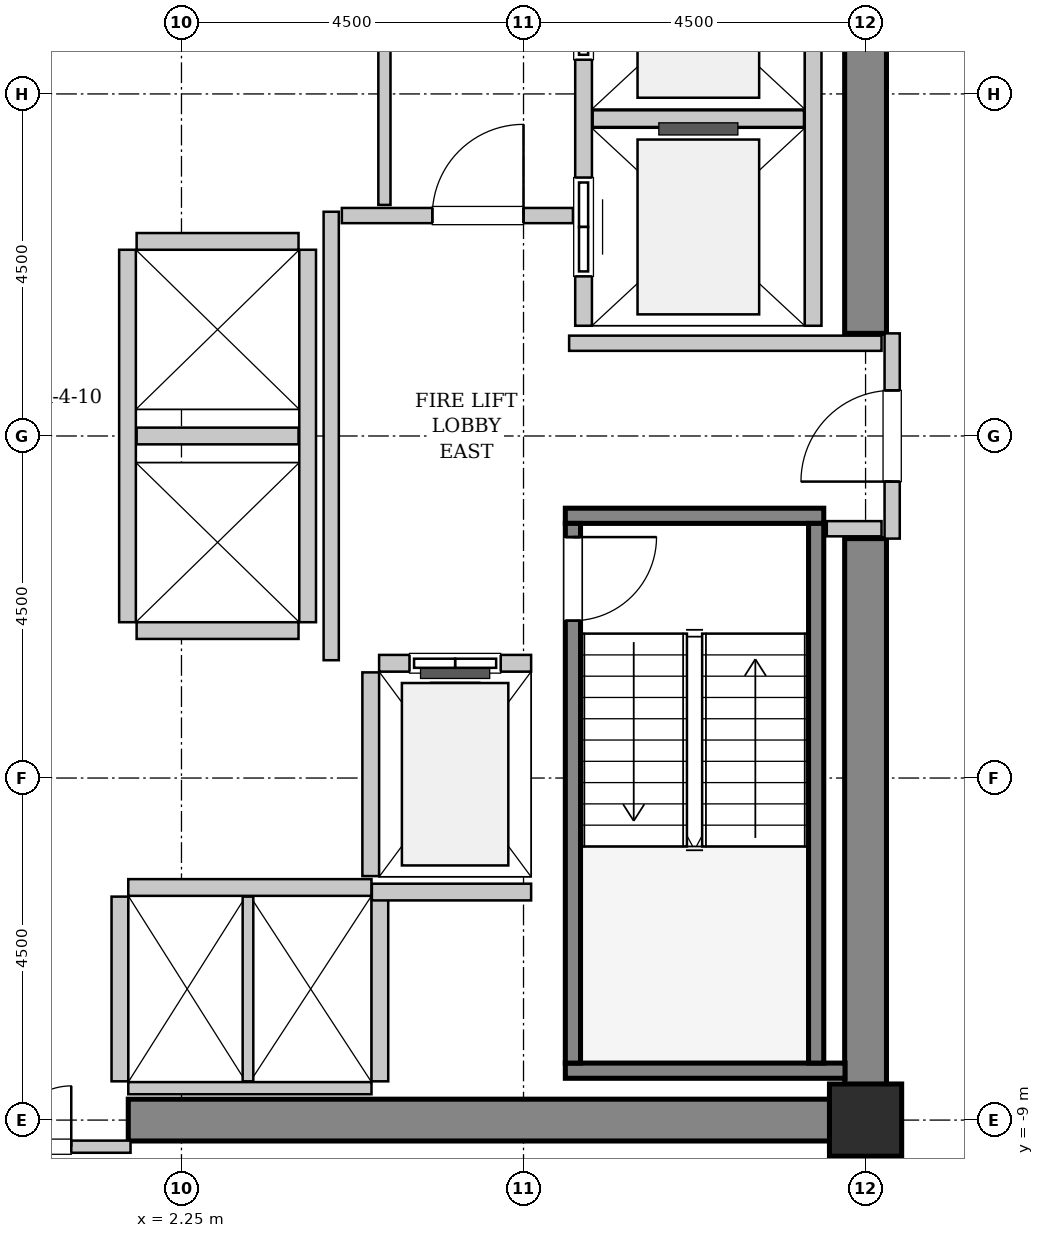
"""IFC4 building model, lengths in metres.
Left out: names, types, materials, properties, quantities, classifications, styles, units other than length and angle.
Written with IfcOpenShell. Run it as: python <this file> out.ifc"""

import sys

from ifc_helpers import new_model, si_unit, direction, frame, frame_2d, origin, origin_2d, place, context, subcontext, project, spatial, rectangle, hollow_rectangle, extrude, source, transform, mapped, element, fill, save


model = new_model("IFC4")
c1 = context("Model", 3, precision=1e-05, world=origin(), true_north=direction((0.0, 1.0)))
c2 = subcontext(c1, "Body", "Model", "MODEL_VIEW")
j1 = project(units=[si_unit("LENGTHUNIT", "METRE"), si_unit("PLANEANGLEUNIT", "RADIAN")], contexts=[c1])
p1 = place(None, origin())
s1 = spatial("IfcSite", under=j1, at=p1, CompositionType="ELEMENT")
p2 = place(p1, origin())
s2 = spatial("IfcBuilding", under=s1, at=p2, CompositionType="ELEMENT")
p3 = place(p2, frame((0.0, 0.0, 132.6)))
s3 = spatial("IfcBuildingStorey", under=s2, at=p3, CompositionType="ELEMENT", Elevation=132.6)
m1 = source(origin(), c2, "Body", "SweptSolid", [
    extrude(rectangle(XDim=9.975, YDim=0.55, at=frame_2d((4.987, 0.0))), origin(), (0.0, 0.0, 1.0), 3.8),
])
p4 = place(p3, frame((1.55, -9.0, 0.0), z_axis=(0.0, 0.0, 1.0), x_axis=(1.0, 0.0, 0.0)))
e1 = element("IfcWall", 1, at=p4, inside=s3, PredefinedType="SHEAR", context=c2, shape_type="MappedRepresentation", body=[
    mapped(m1, transform((0.0, 0.0, 0.0), x_axis=(1.0, 0.0, 0.0), y_axis=(0.0, 1.0, 0.0), z_axis=(0.0, 0.0, 1.0), scale=1.0)),
])
m2 = source(origin(), c2, "Body", "SweptSolid", [
    extrude(rectangle(XDim=7.375, YDim=0.55, at=frame_2d((3.688, 0.0))), origin(), (0.0, 0.0, 1.0), 3.8),
])
for number, where, z_axis, x_axis in (
    (2, (11.25, -8.725, 0.0), (0.0, 0.0, 1.0), (0.0, 1.0, 0.0)),
    (3, (11.25, 1.35, 0.0), (0.0, 0.0, 1.0), (0.0, 1.0, 0.0)),
):
    element("IfcWall", number, at=place(p3, frame(where, z_axis=z_axis, x_axis=x_axis)), inside=s3, PredefinedType="SHEAR", context=c2, shape_type="MappedRepresentation", body=[
        mapped(m2, transform((0.0, 0.0, 0.0), x_axis=(1.0, 0.0, 0.0), y_axis=(0.0, 1.0, 0.0), z_axis=(0.0, 0.0, 1.0), scale=1.0)),
    ])
m3 = source(origin(), c2, "Body", "SweptSolid", [
    extrude(hollow_rectangle(XDim=0.95, YDim=0.95, WallThickness=0.045, InnerFilletRadius=0.045, OuterFilletRadius=0.09, at=origin_2d()), origin(), (0.0, 0.0, 1.0), 3.8),
])
p5 = place(p3, frame((11.25, -9.0, 0.0), z_axis=(0.0, 0.0, 1.0), x_axis=(1.0, 0.0, 0.0)))
e4 = element("IfcColumn", 4, at=p5, inside=s3, PredefinedType="COLUMN", context=c2, shape_type="MappedRepresentation", body=[
    mapped(m3, transform((0.0, 0.0, 0.0), x_axis=(1.0, 0.0, 0.0), y_axis=(0.0, 1.0, 0.0), z_axis=(0.0, 0.0, 1.0), scale=1.0)),
])
m4 = source(origin(), c2, "Body", "SweptSolid", [
    extrude(rectangle(XDim=3.4, YDim=0.2, at=frame_2d((1.7, 0.0))), origin(), (0.0, 0.0, 1.0), 3.8),
])
p6 = place(p3, frame((7.3, -1.05, 0.0), z_axis=(0.0, 0.0, 1.0), x_axis=(1.0, 0.0, 0.0)))
e5 = element("IfcWall", 5, at=p6, inside=s3, PredefinedType="SOLIDWALL", context=c2, shape_type="MappedRepresentation", body=[
    mapped(m4, transform((0.0, 0.0, 0.0), x_axis=(1.0, 0.0, 0.0), y_axis=(0.0, 1.0, 0.0), z_axis=(0.0, 0.0, 1.0), scale=1.0)),
])
m5 = source(origin(), c2, "Body", "SweptSolid", [
    extrude(rectangle(XDim=3.68, YDim=0.2, at=frame_2d((1.84, 0.0))), origin(), (0.0, 0.0, 1.0), 3.8),
])
p7 = place(p3, frame((7.3, -8.35, 0.0), z_axis=(0.0, 0.0, 1.0), x_axis=(1.0, 0.0, 0.0)))
e6 = element("IfcWall", 6, at=p7, inside=s3, PredefinedType="SOLIDWALL", context=c2, shape_type="MappedRepresentation", body=[
    mapped(m5, transform((0.0, 0.0, 0.0), x_axis=(1.0, 0.0, 0.0), y_axis=(0.0, 1.0, 0.0), z_axis=(0.0, 0.0, 1.0), scale=1.0)),
])
m6 = source(origin(), c2, "Body", "SweptSolid", [
    extrude(rectangle(XDim=7.1, YDim=0.2, at=frame_2d((3.55, 0.0))), origin(), (0.0, 0.0, 1.0), 3.8),
])
p8 = place(p3, frame((7.4, -1.15, 0.0), z_axis=(0.0, 0.0, 1.0), x_axis=(0.0, -1.0, 0.0)))
e7 = element("IfcWall", 7, at=p8, inside=s3, PredefinedType="SOLIDWALL", context=c2, shape_type="MappedRepresentation", body=[
    mapped(m6, transform((0.0, 0.0, 0.0), x_axis=(1.0, 0.0, 0.0), y_axis=(0.0, 1.0, 0.0), z_axis=(0.0, 0.0, 1.0), scale=1.0)),
])
p9 = place(p8, frame((0.18, 0.0, 0.0)))
e8 = element("IfcOpeningElement", 8, at=p9, cuts=e7, PredefinedType="OPENING", context=c2, shape_type="SweptSolid", body=[
    extrude(rectangle(XDim=1.1, YDim=2.15, at=frame_2d((0.55, 1.075))), frame((0.0, 0.11, 0.0), z_axis=(0.0, -1.0, 0.0), x_axis=(1.0, 0.0, 0.0)), (0.0, 0.0, 1.0), 0.22),
])
p10 = place(p3, frame((10.6, -1.15, 0.0), z_axis=(0.0, 0.0, 1.0), x_axis=(0.0, -1.0, 0.0)))
e9 = element("IfcWall", 9, at=p10, inside=s3, PredefinedType="SOLIDWALL", context=c2, shape_type="MappedRepresentation", body=[
    mapped(m6, transform((0.0, 0.0, 0.0), x_axis=(1.0, 0.0, 0.0), y_axis=(0.0, 1.0, 0.0), z_axis=(0.0, 0.0, 1.0), scale=1.0)),
])
m7 = source(origin(), c2, "Body", "SweptSolid", [
    extrude(rectangle(XDim=2.0, YDim=0.22, at=frame_2d((1.0, 0.0))), origin(), (0.0, 0.0, 1.0), 3.535),
])
p11 = place(p3, frame((6.85, -2.99, 0.0), z_axis=(0.0, 0.0, 1.0), x_axis=(-1.0, 0.0, 0.0)))
e10 = element("IfcWall", 10, at=p11, inside=s3, PredefinedType="SOLIDWALL", context=c2, shape_type="MappedRepresentation", body=[
    mapped(m7, transform((0.0, 0.0, 0.0), x_axis=(1.0, 0.0, 0.0), y_axis=(0.0, 1.0, 0.0), z_axis=(0.0, 0.0, 1.0), scale=1.0)),
])
p12 = place(p11, frame((0.4, 0.0, 0.0)))
e11 = element("IfcOpeningElement", 11, at=p12, cuts=e10, PredefinedType="OPENING", context=c2, shape_type="SweptSolid", body=[
    extrude(rectangle(XDim=1.2, YDim=2.2, at=frame_2d((0.6, 1.1))), frame((0.0, 0.12, 0.0), z_axis=(0.0, -1.0, 0.0), x_axis=(1.0, 0.0, 0.0)), (0.0, 0.0, 1.0), 0.24),
])
m8 = source(origin(), c2, "Body", "SweptSolid", [
    extrude(rectangle(XDim=2.68, YDim=0.22, at=frame_2d((1.34, 0.0))), origin(), (0.0, 0.0, 1.0), 3.535),
])
p13 = place(p3, frame((4.74, -3.11, 0.0), z_axis=(0.0, 0.0, 1.0), x_axis=(0.0, -1.0, 0.0)))
e12 = element("IfcWall", 12, at=p13, inside=s3, PredefinedType="SOLIDWALL", context=c2, shape_type="MappedRepresentation", body=[
    mapped(m8, transform((0.0, 0.0, 0.0), x_axis=(1.0, 0.0, 0.0), y_axis=(0.0, 1.0, 0.0), z_axis=(0.0, 0.0, 1.0), scale=1.0)),
])
m9 = source(origin(), c2, "Body", "SweptSolid", [
    extrude(rectangle(XDim=5.45, YDim=0.22, at=frame_2d((2.725, 0.0))), origin(), (0.0, 0.0, 1.0), 3.535),
])
p14 = place(p3, frame((7.54, 6.9, 0.0), z_axis=(0.0, 0.0, 1.0), x_axis=(0.0, -1.0, 0.0)))
e13 = element("IfcWall", 13, at=p14, inside=s3, PredefinedType="SOLIDWALL", context=c2, shape_type="MappedRepresentation", body=[
    mapped(m9, transform((0.0, 0.0, 0.0), x_axis=(1.0, 0.0, 0.0), y_axis=(0.0, 1.0, 0.0), z_axis=(0.0, 0.0, 1.0), scale=1.0)),
])
p15 = place(p14, frame((3.5, 0.0, 0.0)))
e14 = element("IfcOpeningElement", 14, at=p15, cuts=e13, PredefinedType="OPENING", context=c2, shape_type="SweptSolid", body=[
    extrude(rectangle(XDim=1.3, YDim=2.3, at=frame_2d((0.65, 1.15))), frame((0.0, 0.12, 0.0), z_axis=(0.0, -1.0, 0.0), x_axis=(1.0, 0.0, 0.0)), (0.0, 0.0, 1.0), 0.24),
])
p16 = place(p14, frame((0.65, 0.0, 0.0)))
e15 = element("IfcOpeningElement", 15, at=p16, cuts=e13, PredefinedType="OPENING", context=c2, shape_type="SweptSolid", body=[
    extrude(rectangle(XDim=1.3, YDim=2.3, at=frame_2d((0.65, 1.15))), frame((0.0, 0.12, 0.0), z_axis=(0.0, -1.0, 0.0), x_axis=(1.0, 0.0, 0.0)), (0.0, 0.0, 1.0), 0.24),
])
p17 = place(p3, frame((10.56, 1.45, 0.0), z_axis=(0.0, 0.0, 1.0), x_axis=(0.0, 1.0, 0.0)))
e16 = element("IfcWall", 16, at=p17, inside=s3, PredefinedType="SOLIDWALL", context=c2, shape_type="MappedRepresentation", body=[
    mapped(m9, transform((0.0, 0.0, 0.0), x_axis=(1.0, 0.0, 0.0), y_axis=(0.0, 1.0, 0.0), z_axis=(0.0, 0.0, 1.0), scale=1.0)),
])
m10 = source(origin(), c2, "Body", "SweptSolid", [
    extrude(rectangle(XDim=2.78, YDim=0.22, at=frame_2d((1.39, 0.0))), origin(), (0.0, 0.0, 1.0), 3.535),
])
p18 = place(p3, frame((7.66, 4.175, 0.0), z_axis=(0.0, 0.0, 1.0), x_axis=(1.0, 0.0, 0.0)))
e17 = element("IfcWall", 17, at=p18, inside=s3, PredefinedType="SOLIDWALL", context=c2, shape_type="MappedRepresentation", body=[
    mapped(m10, transform((0.0, 0.0, 0.0), x_axis=(1.0, 0.0, 0.0), y_axis=(0.0, 1.0, 0.0), z_axis=(0.0, 0.0, 1.0), scale=1.0)),
])
m11 = source(origin(), c2, "Body", "SweptSolid", [
    extrude(rectangle(XDim=3.2, YDim=0.22, at=frame_2d((1.6, 0.0))), origin(), (0.0, 0.0, 1.0), 3.535),
])
p19 = place(p3, frame((4.75, -5.94, 0.0), z_axis=(0.0, 0.0, 1.0), x_axis=(-1.0, 0.0, 0.0)))
e18 = element("IfcWall", 18, at=p19, inside=s3, PredefinedType="SOLIDWALL", context=c2, shape_type="MappedRepresentation", body=[
    mapped(m11, transform((0.0, 0.0, 0.0), x_axis=(1.0, 0.0, 0.0), y_axis=(0.0, 1.0, 0.0), z_axis=(0.0, 0.0, 1.0), scale=1.0)),
])
m12 = source(origin(), c2, "Body", "SweptSolid", [
    extrude(rectangle(XDim=3.2, YDim=0.16, at=frame_2d((1.6, 0.0))), origin(), (0.0, 0.0, 1.0), 2.425),
])
p20 = place(p3, frame((1.55, -8.58, 0.0), z_axis=(0.0, 0.0, 1.0), x_axis=(1.0, 0.0, 0.0)))
e19 = element("IfcWall", 19, at=p20, inside=s3, PredefinedType="PARTITIONING", context=c2, shape_type="MappedRepresentation", body=[
    mapped(m12, transform((0.0, 0.0, 0.0), x_axis=(1.0, 0.0, 0.0), y_axis=(0.0, 1.0, 0.0), z_axis=(0.0, 0.0, 1.0), scale=1.0)),
])
m13 = source(origin(), c2, "Body", "SweptSolid", [
    extrude(rectangle(XDim=2.43, YDim=0.22, at=frame_2d((1.215, 0.0))), origin(), (0.0, 0.0, 1.0), 3.535),
])
p21 = place(p3, frame((1.44, -6.06, 0.0), z_axis=(0.0, 0.0, 1.0), x_axis=(0.0, -1.0, 0.0)))
e20 = element("IfcWall", 20, at=p21, inside=s3, PredefinedType="SOLIDWALL", context=c2, shape_type="MappedRepresentation", body=[
    mapped(m13, transform((0.0, 0.0, 0.0), x_axis=(1.0, 0.0, 0.0), y_axis=(0.0, 1.0, 0.0), z_axis=(0.0, 0.0, 1.0), scale=1.0)),
])
m14 = source(origin(), c2, "Body", "SweptSolid", [
    extrude(rectangle(XDim=2.43, YDim=0.14, at=frame_2d((1.215, 0.0))), origin(), (0.0, 0.0, 1.0), 3.535),
])
p22 = place(p3, frame((3.125, -8.49, 0.0), z_axis=(0.0, 0.0, 1.0), x_axis=(0.0, 1.0, 0.0)))
e21 = element("IfcWall", 21, at=p22, inside=s3, PredefinedType="PARTITIONING", context=c2, shape_type="MappedRepresentation", body=[
    mapped(m14, transform((0.0, 0.0, 0.0), x_axis=(1.0, 0.0, 0.0), y_axis=(0.0, 1.0, 0.0), z_axis=(0.0, 0.0, 1.0), scale=1.0)),
])
p23 = place(p3, frame((4.86, -8.49, 0.0), z_axis=(0.0, 0.0, 1.0), x_axis=(0.0, 1.0, 0.0)))
e22 = element("IfcWall", 22, at=p23, inside=s3, PredefinedType="SOLIDWALL", context=c2, shape_type="MappedRepresentation", body=[
    mapped(m13, transform((0.0, 0.0, 0.0), x_axis=(1.0, 0.0, 0.0), y_axis=(0.0, 1.0, 0.0), z_axis=(0.0, 0.0, 1.0), scale=1.0)),
])
m15 = source(origin(), c2, "Body", "SweptSolid", [
    extrude(rectangle(XDim=4.9, YDim=0.22, at=frame_2d((2.45, 0.0))), origin(), (0.0, 0.0, 1.0), 3.535),
])
for number, where, z_axis, x_axis in (
    (23, (1.54, 2.45, 0.0), (0.0, 0.0, 1.0), (0.0, -1.0, 0.0)),
    (24, (3.91, -2.45, 0.0), (0.0, 0.0, 1.0), (0.0, 1.0, 0.0)),
):
    element("IfcWall", number, at=place(p3, frame(where, z_axis=z_axis, x_axis=x_axis)), inside=s3, PredefinedType="SOLIDWALL", context=c2, shape_type="MappedRepresentation", body=[
        mapped(m15, transform((0.0, 0.0, 0.0), x_axis=(1.0, 0.0, 0.0), y_axis=(0.0, 1.0, 0.0), z_axis=(0.0, 0.0, 1.0), scale=1.0)),
    ])
m16 = source(origin(), c2, "Body", "SweptSolid", [
    extrude(rectangle(XDim=2.13, YDim=0.22, at=frame_2d((1.065, 0.0))), origin(), (0.0, 0.0, 1.0), 3.535),
])
for number, where, z_axis, x_axis in (
    (25, (1.66, -2.56, 0.0), (0.0, 0.0, 1.0), (1.0, 0.0, 0.0)),
    (26, (1.66, 0.0, 0.0), (0.0, 0.0, 1.0), (1.0, 0.0, 0.0)),
    (27, (3.79, 2.56, 0.0), (0.0, 0.0, 1.0), (-1.0, 0.0, 0.0)),
):
    element("IfcWall", number, at=place(p3, frame(where, z_axis=z_axis, x_axis=x_axis)), inside=s3, PredefinedType="SOLIDWALL", context=c2, shape_type="MappedRepresentation", body=[
        mapped(m16, transform((0.0, 0.0, 0.0), x_axis=(1.0, 0.0, 0.0), y_axis=(0.0, 1.0, 0.0), z_axis=(0.0, 0.0, 1.0), scale=1.0)),
    ])
m17 = source(origin(), c2, "Body", "SweptSolid", [
    extrude(rectangle(XDim=2.095, YDim=0.22, at=frame_2d((1.048, 0.0))), origin(), (0.0, 0.0, 1.0), 3.535),
])
p24 = place(p3, frame((4.755, -6.0, 0.0), z_axis=(0.0, 0.0, 1.0), x_axis=(1.0, 0.0, 0.0)))
e28 = element("IfcWall", 28, at=p24, inside=s3, PredefinedType="SOLIDWALL", context=c2, shape_type="MappedRepresentation", body=[
    mapped(m17, transform((0.0, 0.0, 0.0), x_axis=(1.0, 0.0, 0.0), y_axis=(0.0, 1.0, 0.0), z_axis=(0.0, 0.0, 1.0), scale=1.0)),
])
m18 = source(origin(), c2, "Body", "SweptSolid", [
    extrude(rectangle(XDim=2.7, YDim=0.2, at=frame_2d((1.35, 0.0))), origin(), (0.0, 0.0, 1.0), 2.425),
])
p25 = place(p3, frame((11.6, -1.35, 0.0), z_axis=(0.0, 0.0, 1.0), x_axis=(0.0, 1.0, 0.0)))
e29 = element("IfcWall", 29, at=p25, inside=s3, PredefinedType="PARTITIONING", context=c2, shape_type="MappedRepresentation", body=[
    mapped(m18, transform((0.0, 0.0, 0.0), x_axis=(1.0, 0.0, 0.0), y_axis=(0.0, 1.0, 0.0), z_axis=(0.0, 0.0, 1.0), scale=1.0)),
])
p26 = place(p25, frame((0.75, 0.0, 0.0)))
e30 = element("IfcOpeningElement", 30, at=p26, cuts=e29, PredefinedType="OPENING", context=c2, shape_type="SweptSolid", body=[
    extrude(rectangle(XDim=1.2, YDim=2.15, at=frame_2d((0.6, 1.075))), frame((0.0, 0.11, 0.0), z_axis=(0.0, -1.0, 0.0), x_axis=(1.0, 0.0, 0.0)), (0.0, 0.0, 1.0), 0.22),
])
m19 = source(origin(), c2, "Body", "SweptSolid", [
    extrude(rectangle(XDim=5.9, YDim=0.2, at=frame_2d((2.95, 0.0))), origin(), (0.0, 0.0, 1.0), 3.535),
])
p27 = place(p3, frame((4.22, -2.95, 0.0), z_axis=(0.0, 0.0, 1.0), x_axis=(0.0, 1.0, 0.0)))
e31 = element("IfcWall", 31, at=p27, inside=s3, PredefinedType="PARTITIONING", context=c2, shape_type="MappedRepresentation", body=[
    mapped(m19, transform((0.0, 0.0, 0.0), x_axis=(1.0, 0.0, 0.0), y_axis=(0.0, 1.0, 0.0), z_axis=(0.0, 0.0, 1.0), scale=1.0)),
])
m20 = source(origin(), c2, "Body", "SweptSolid", [
    extrude(rectangle(XDim=3.04, YDim=0.2, at=frame_2d((1.52, 0.0))), origin(), (0.0, 0.0, 1.0), 3.535),
])
p28 = place(p3, frame((4.36, 2.9, 0.0), z_axis=(0.0, 0.0, 1.0), x_axis=(1.0, 0.0, 0.0)))
e32 = element("IfcWall", 32, at=p28, inside=s3, PredefinedType="PARTITIONING", context=c2, shape_type="MappedRepresentation", body=[
    mapped(m20, transform((0.0, 0.0, 0.0), x_axis=(1.0, 0.0, 0.0), y_axis=(0.0, 1.0, 0.0), z_axis=(0.0, 0.0, 1.0), scale=1.0)),
])
p29 = place(p28, frame((1.19, 0.0, 0.0)))
e33 = element("IfcOpeningElement", 33, at=p29, cuts=e32, PredefinedType="OPENING", context=c2, shape_type="SweptSolid", body=[
    extrude(rectangle(XDim=1.2, YDim=2.15, at=frame_2d((0.6, 1.075))), frame((0.0, 0.11, 0.0), z_axis=(0.0, -1.0, 0.0), x_axis=(1.0, 0.0, 0.0)), (0.0, 0.0, 1.0), 0.22),
])
m21 = source(origin(), c2, "Body", "SweptSolid", [
    extrude(rectangle(XDim=4.11, YDim=0.2, at=frame_2d((2.055, 0.0))), origin(), (0.0, 0.0, 1.0), 3.535),
])
p30 = place(p3, frame((7.35, 1.22, 0.0), z_axis=(0.0, 0.0, 1.0), x_axis=(1.0, 0.0, 0.0)))
e34 = element("IfcWall", 34, at=p30, inside=s3, PredefinedType="PARTITIONING", context=c2, shape_type="MappedRepresentation", body=[
    mapped(m21, transform((0.0, 0.0, 0.0), x_axis=(1.0, 0.0, 0.0), y_axis=(0.0, 1.0, 0.0), z_axis=(0.0, 0.0, 1.0), scale=1.0)),
])
m22 = source(origin(), c2, "Body", "SweptSolid", [
    extrude(rectangle(XDim=0.72, YDim=0.2, at=frame_2d((0.36, 0.0))), origin(), (0.0, 0.0, 1.0), 3.535),
])
p31 = place(p3, frame((10.74, -1.22, 0.0), z_axis=(0.0, 0.0, 1.0), x_axis=(1.0, 0.0, 0.0)))
e35 = element("IfcWall", 35, at=p31, inside=s3, PredefinedType="PARTITIONING", context=c2, shape_type="MappedRepresentation", body=[
    mapped(m22, transform((0.0, 0.0, 0.0), x_axis=(1.0, 0.0, 0.0), y_axis=(0.0, 1.0, 0.0), z_axis=(0.0, 0.0, 1.0), scale=1.0)),
])
m23 = source(origin(), c2, "Body", "SweptSolid", [
    extrude(rectangle(XDim=3.16, YDim=0.16, at=frame_2d((1.58, 0.0))), origin(), (0.0, 0.0, 1.0), 2.425),
])
p32 = place(p3, frame((-1.58, -9.35, 0.0), z_axis=(0.0, 0.0, 1.0), x_axis=(1.0, 0.0, 0.0)))
e36 = element("IfcWall", 36, at=p32, inside=s3, PredefinedType="PARTITIONING", context=c2, shape_type="MappedRepresentation", body=[
    mapped(m23, transform((0.0, 0.0, 0.0), x_axis=(1.0, 0.0, 0.0), y_axis=(0.0, 1.0, 0.0), z_axis=(0.0, 0.0, 1.0), scale=1.0)),
])
p33 = place(p32, frame((0.78, 0.0, 0.0)))
e37 = element("IfcOpeningElement", 37, at=p33, cuts=e36, PredefinedType="OPENING", context=c2, shape_type="SweptSolid", body=[
    extrude(rectangle(XDim=1.6, YDim=2.3, at=frame_2d((0.8, 1.15))), frame((0.0, 0.09, 0.0), z_axis=(0.0, -1.0, 0.0), x_axis=(1.0, 0.0, 0.0)), (0.0, 0.0, 1.0), 0.18),
])
m24 = source(origin(), c2, "Body", "SweptSolid", [
    extrude(rectangle(XDim=3.015, YDim=0.16, at=frame_2d((1.507, 0.0))), origin(), (0.0, 0.0, 1.0), 3.535),
])
p34 = place(p3, frame((4.92, 3.04, 0.0), z_axis=(0.0, 0.0, 1.0), x_axis=(0.0, 1.0, 0.0)))
e38 = element("IfcWall", 38, at=p34, inside=s3, PredefinedType="PARTITIONING", context=c2, shape_type="MappedRepresentation", body=[
    mapped(m24, transform((0.0, 0.0, 0.0), x_axis=(1.0, 0.0, 0.0), y_axis=(0.0, 1.0, 0.0), z_axis=(0.0, 0.0, 1.0), scale=1.0)),
])
m25 = source(origin(), c2, "Body", "SweptSolid", [
    extrude(rectangle(XDim=1.1, YDim=2.15, at=frame_2d((0.55, 1.075))), frame((0.0, 0.025, 0.0), z_axis=(0.0, -1.0, 0.0), x_axis=(1.0, 0.0, 0.0)), (0.0, 0.0, 1.0), 0.05),
])
p35 = place(p9, origin())
e39 = element("IfcDoor", 39, at=p35, inside=s3, OperationType="SINGLE_SWING_LEFT", PredefinedType="DOOR", context=c2, shape_type="MappedRepresentation", body=[
    mapped(m25, transform((0.0, 0.0, 0.0), x_axis=(1.0, 0.0, 0.0), y_axis=(0.0, 1.0, 0.0), z_axis=(0.0, 0.0, 1.0), scale=1.0)),
])
fill(e8, e39)
m26 = source(origin(), c2, "Body", "SweptSolid", [
    extrude(rectangle(XDim=1.2, YDim=2.2, at=frame_2d((0.6, 1.1))), frame((0.0, 0.025, 0.0), z_axis=(0.0, -1.0, 0.0), x_axis=(1.0, 0.0, 0.0)), (0.0, 0.0, 1.0), 0.05),
])
p36 = place(p12, origin())
e40 = element("IfcDoor", 40, at=p36, inside=s3, OperationType="SLIDING_TO_LEFT", PredefinedType="DOOR", context=c2, shape_type="MappedRepresentation", body=[
    mapped(m26, transform((0.0, 0.0, 0.0), x_axis=(1.0, 0.0, 0.0), y_axis=(0.0, 1.0, 0.0), z_axis=(0.0, 0.0, 1.0), scale=1.0)),
])
fill(e11, e40)
m27 = source(origin(), c2, "Body", "SweptSolid", [
    extrude(rectangle(XDim=1.3, YDim=2.3, at=frame_2d((0.65, 1.15))), frame((0.0, 0.025, 0.0), z_axis=(0.0, -1.0, 0.0), x_axis=(1.0, 0.0, 0.0)), (0.0, 0.0, 1.0), 0.05),
])
p37 = place(p15, origin())
e41 = element("IfcDoor", 41, at=p37, inside=s3, OperationType="SLIDING_TO_RIGHT", PredefinedType="DOOR", context=c2, shape_type="MappedRepresentation", body=[
    mapped(m27, transform((0.0, 0.0, 0.0), x_axis=(1.0, 0.0, 0.0), y_axis=(0.0, 1.0, 0.0), z_axis=(0.0, 0.0, 1.0), scale=1.0)),
])
fill(e14, e41)
p38 = place(p16, origin())
e42 = element("IfcDoor", 42, at=p38, inside=s3, OperationType="SLIDING_TO_RIGHT", PredefinedType="DOOR", context=c2, shape_type="MappedRepresentation", body=[
    mapped(m27, transform((0.0, 0.0, 0.0), x_axis=(1.0, 0.0, 0.0), y_axis=(0.0, 1.0, 0.0), z_axis=(0.0, 0.0, 1.0), scale=1.0)),
])
fill(e15, e42)
m28 = source(origin(), c2, "Body", "SweptSolid", [
    extrude(rectangle(XDim=1.2, YDim=2.15, at=frame_2d((0.6, 1.075))), frame((0.0, 0.025, 0.0), z_axis=(0.0, -1.0, 0.0), x_axis=(1.0, 0.0, 0.0)), (0.0, 0.0, 1.0), 0.05),
])
p39 = place(p26, origin())
e43 = element("IfcDoor", 43, at=p39, inside=s3, OperationType="SINGLE_SWING_LEFT", PredefinedType="DOOR", context=c2, shape_type="MappedRepresentation", body=[
    mapped(m28, transform((0.0, 0.0, 0.0), x_axis=(1.0, 0.0, 0.0), y_axis=(0.0, 1.0, 0.0), z_axis=(0.0, 0.0, 1.0), scale=1.0)),
])
fill(e30, e43)
p40 = place(p29, origin())
e44 = element("IfcDoor", 44, at=p40, inside=s3, OperationType="SINGLE_SWING_RIGHT", PredefinedType="DOOR", context=c2, shape_type="MappedRepresentation", body=[
    mapped(m28, transform((0.0, 0.0, 0.0), x_axis=(1.0, 0.0, 0.0), y_axis=(0.0, 1.0, 0.0), z_axis=(0.0, 0.0, 1.0), scale=1.0)),
])
fill(e33, e44)
m29 = source(origin(), c2, "Body", "SweptSolid", [
    extrude(rectangle(XDim=1.6, YDim=2.3, at=frame_2d((0.8, 1.15))), frame((0.0, 0.025, 0.0), z_axis=(0.0, -1.0, 0.0), x_axis=(1.0, 0.0, 0.0)), (0.0, 0.0, 1.0), 0.05),
])
p41 = place(p33, origin())
e45 = element("IfcDoor", 45, at=p41, inside=s3, OperationType="DOUBLE_DOOR_SINGLE_SWING", PredefinedType="DOOR", context=c2, shape_type="MappedRepresentation", body=[
    mapped(m29, transform((0.0, 0.0, 0.0), x_axis=(1.0, 0.0, 0.0), y_axis=(0.0, 1.0, 0.0), z_axis=(0.0, 0.0, 1.0), scale=1.0)),
])
fill(e37, e45)
save(model, sys.argv[1])
